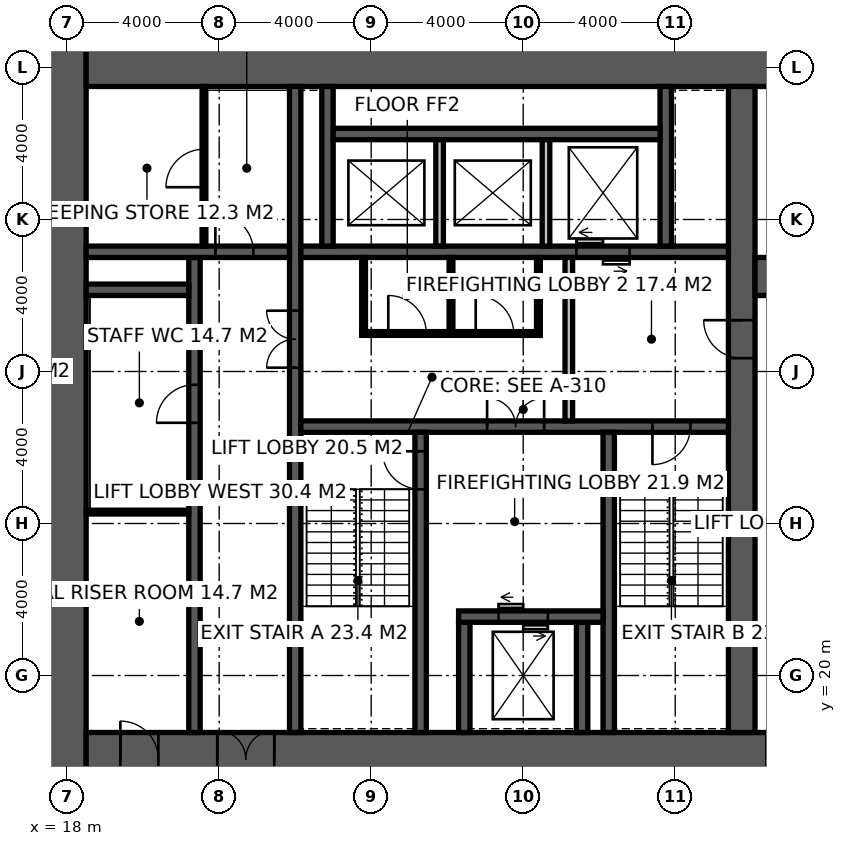
"""IFC4 building model, lengths in metres.
Left out: names, types, materials, properties, quantities, classifications, styles, units other than length and angle.
Written with IfcOpenShell. Run it as: python <this file> out.ifc"""

import sys

from ifc_helpers import new_model, si_unit, direction, frame, frame_2d, origin, place, context, subcontext, project, spatial, rectangle, extrude, element, fill, save


model = new_model("IFC4")
c1 = context("Model", 3, precision=1e-05, world=origin(), true_north=direction((0.0, 1.0)))
c2 = subcontext(c1, "Body", "Model", "MODEL_VIEW")
j1 = project(units=[si_unit("LENGTHUNIT", "METRE"), si_unit("PLANEANGLEUNIT", "RADIAN")], contexts=[c1])
p1 = place(None, origin())
s1 = spatial("IfcSite", under=j1, at=p1, CompositionType="ELEMENT")
p2 = place(p1, origin())
s2 = spatial("IfcBuilding", under=s1, at=p2, CompositionType="ELEMENT")
p3 = place(p2, frame((0.0, 0.0, 11.0)))
s3 = spatial("IfcBuildingStorey", under=s2, at=p3, CompositionType="ELEMENT", Elevation=11.0)
p4 = place(p3, frame((18.0, 17.1, -0.15), z_axis=(0.0, 0.0, 1.0), x_axis=(0.0, 1.0, 0.0)))
e1 = element("IfcWall", 1, at=p4, inside=s3, PredefinedType="SHEAR", context=c2, shape_type="SweptSolid", body=[
    extrude(rectangle(XDim=19.8, YDim=1.0, at=frame_2d((9.9, 0.0))), origin(), (0.0, 0.0, 1.0), 4.0),
])
p5 = place(p3, frame((18.5, 17.8, -0.15), z_axis=(0.0, 0.0, 1.0), x_axis=(1.0, 0.0, 0.0)))
e2 = element("IfcWall", 2, at=p5, inside=s3, PredefinedType="SHEAR", context=c2, shape_type="SweptSolid", body=[
    extrude(rectangle(XDim=23.0, YDim=1.4, at=frame_2d((11.5, 0.0))), origin(), (0.0, 0.0, 1.0), 4.0),
])
p6 = place(p5, frame((3.45, 0.0, 0.15)))
e3 = element("IfcOpeningElement", 3, at=p6, cuts=e2, PredefinedType="OPENING", context=c2, shape_type="SweptSolid", body=[
    extrude(rectangle(XDim=1.5, YDim=2.4, at=frame_2d((0.75, 1.2))), frame((0.0, 0.71, 0.0), z_axis=(0.0, -1.0, 0.0), x_axis=(1.0, 0.0, 0.0)), (0.0, 0.0, 1.0), 1.42),
])
p7 = place(p5, frame((17.9, 0.0, 0.15)))
e4 = element("IfcOpeningElement", 4, at=p7, cuts=e2, PredefinedType="OPENING", context=c2, shape_type="SweptSolid", body=[
    extrude(rectangle(XDim=1.5, YDim=2.4, at=frame_2d((0.75, 1.2))), frame((0.0, 0.71, 0.0), z_axis=(0.0, -1.0, 0.0), x_axis=(1.0, 0.0, 0.0)), (0.0, 0.0, 1.0), 1.42),
])
p8 = place(p5, frame((0.9, 0.0, 0.15)))
e5 = element("IfcOpeningElement", 5, at=p8, cuts=e2, PredefinedType="OPENING", context=c2, shape_type="SweptSolid", body=[
    extrude(rectangle(XDim=1.0, YDim=2.2, at=frame_2d((0.5, 1.1))), frame((0.0, 0.71, 0.0), z_axis=(0.0, -1.0, 0.0), x_axis=(1.0, 0.0, 0.0)), (0.0, 0.0, 1.0), 1.42),
])
p9 = place(p3, frame((18.5, 36.2, -0.15), z_axis=(0.0, 0.0, 1.0), x_axis=(1.0, 0.0, 0.0)))
e6 = element("IfcWall", 6, at=p9, inside=s3, PredefinedType="SHEAR", context=c2, shape_type="SweptSolid", body=[
    extrude(rectangle(XDim=23.0, YDim=1.4, at=frame_2d((11.5, 0.0))), origin(), (0.0, 0.0, 1.0), 4.0),
])
p10 = place(p3, frame((35.75, 18.5, -0.15), z_axis=(0.0, 0.0, 1.0), x_axis=(0.0, 1.0, 0.0)))
e7 = element("IfcWall", 7, at=p10, inside=s3, PredefinedType="SHEAR", context=c2, shape_type="SweptSolid", body=[
    extrude(rectangle(XDim=17.0, YDim=0.7, at=frame_2d((8.5, 0.0))), origin(), (0.0, 0.0, 1.0), 4.0),
])
p11 = place(p10, frame((9.85, 0.0, 0.15)))
e8 = element("IfcOpeningElement", 8, at=p11, cuts=e7, PredefinedType="OPENING", context=c2, shape_type="SweptSolid", body=[
    extrude(rectangle(XDim=1.0, YDim=2.2, at=frame_2d((0.5, 1.1))), frame((0.0, 0.36, 0.0), z_axis=(0.0, -1.0, 0.0), x_axis=(1.0, 0.0, 0.0)), (0.0, 0.0, 1.0), 0.72),
])
p12 = place(p3, frame((24.0, 18.5, -0.15), z_axis=(0.0, 0.0, 1.0), x_axis=(0.0, 1.0, 0.0)))
e9 = element("IfcWall", 9, at=p12, inside=s3, PredefinedType="SHEAR", context=c2, shape_type="SweptSolid", body=[
    extrude(rectangle(XDim=17.0, YDim=0.3, at=frame_2d((8.5, 0.0))), origin(), (0.0, 0.0, 1.0), 4.0),
])
p13 = place(p12, frame((9.6, 0.0, 0.15)))
e10 = element("IfcOpeningElement", 10, at=p13, cuts=e9, PredefinedType="OPENING", context=c2, shape_type="SweptSolid", body=[
    extrude(rectangle(XDim=1.5, YDim=2.4, at=frame_2d((0.75, 1.2))), frame((0.0, 0.16, 0.0), z_axis=(0.0, -1.0, 0.0), x_axis=(1.0, 0.0, 0.0)), (0.0, 0.0, 1.0), 0.32),
])
p14 = place(p3, frame((24.15, 26.55, -0.15), z_axis=(0.0, 0.0, 1.0), x_axis=(1.0, 0.0, 0.0)))
e11 = element("IfcWall", 11, at=p14, inside=s3, PredefinedType="SHEAR", context=c2, shape_type="SweptSolid", body=[
    extrude(rectangle(XDim=11.25, YDim=0.3, at=frame_2d((5.625, 0.0))), origin(), (0.0, 0.0, 1.0), 4.0),
])
p15 = place(p14, frame((9.25, 0.0, 0.15)))
e12 = element("IfcOpeningElement", 12, at=p15, cuts=e11, PredefinedType="OPENING", context=c2, shape_type="SweptSolid", body=[
    extrude(rectangle(XDim=1.0, YDim=2.2, at=frame_2d((0.5, 1.1))), frame((0.0, 0.16, 0.0), z_axis=(0.0, -1.0, 0.0), x_axis=(1.0, 0.0, 0.0)), (0.0, 0.0, 1.0), 0.32),
])
p16 = place(p14, frame((4.9, 0.0, 0.15)))
e13 = element("IfcOpeningElement", 13, at=p16, cuts=e11, PredefinedType="OPENING", context=c2, shape_type="SweptSolid", body=[
    extrude(rectangle(XDim=1.5, YDim=2.4, at=frame_2d((0.75, 1.2))), frame((0.0, 0.16, 0.0), z_axis=(0.0, -1.0, 0.0), x_axis=(1.0, 0.0, 0.0)), (0.0, 0.0, 1.0), 0.32),
])
p17 = place(p3, frame((27.3, 18.5, -0.15), z_axis=(0.0, 0.0, 1.0), x_axis=(0.0, 1.0, 0.0)))
e14 = element("IfcWall", 14, at=p17, inside=s3, PredefinedType="SHEAR", context=c2, shape_type="SweptSolid", body=[
    extrude(rectangle(XDim=7.9, YDim=0.3, at=frame_2d((3.95, 0.0))), origin(), (0.0, 0.0, 1.0), 4.0),
])
p18 = place(p17, frame((6.4, 0.0, 0.15)))
e15 = element("IfcOpeningElement", 15, at=p18, cuts=e14, PredefinedType="OPENING", context=c2, shape_type="SweptSolid", body=[
    extrude(rectangle(XDim=1.0, YDim=2.2, at=frame_2d((0.5, 1.1))), frame((0.0, 0.16, 0.0), z_axis=(0.0, -1.0, 0.0), x_axis=(1.0, 0.0, 0.0)), (0.0, 0.0, 1.0), 0.32),
])
p19 = place(p3, frame((32.25, 18.5, -0.15), z_axis=(0.0, 0.0, 1.0), x_axis=(0.0, 1.0, 0.0)))
e16 = element("IfcWall", 16, at=p19, inside=s3, PredefinedType="SHEAR", context=c2, shape_type="SweptSolid", body=[
    extrude(rectangle(XDim=7.9, YDim=0.3, at=frame_2d((3.95, 0.0))), origin(), (0.0, 0.0, 1.0), 4.0),
])
for number, where, z_axis, x_axis in (
    (17, (28.45, 18.5, -0.15), (0.0, 0.0, 1.0), (0.0, 1.0, 0.0)),
    (18, (31.55, 18.5, -0.15), (0.0, 0.0, 1.0), (0.0, 1.0, 0.0)),
):
    element("IfcWall", number, at=place(p3, frame(where, z_axis=z_axis, x_axis=x_axis)), inside=s3, PredefinedType="SHEAR", context=c2, shape_type="SweptSolid", body=[
        extrude(rectangle(XDim=2.9, YDim=0.3, at=frame_2d((1.45, 0.0))), origin(), (0.0, 0.0, 1.0), 4.0),
    ])
p20 = place(p3, frame((28.3, 21.55, -0.15), z_axis=(0.0, 0.0, 1.0), x_axis=(1.0, 0.0, 0.0)))
e19 = element("IfcWall", 19, at=p20, inside=s3, PredefinedType="SHEAR", context=c2, shape_type="SweptSolid", body=[
    extrude(rectangle(XDim=3.8, YDim=0.3, at=frame_2d((1.9, 0.0))), origin(), (0.0, 0.0, 1.0), 4.0),
])
p21 = place(p20, frame((1.05, 0.0, 0.15)))
e20 = element("IfcOpeningElement", 20, at=p21, cuts=e19, PredefinedType="OPENING", context=c2, shape_type="SweptSolid", body=[
    extrude(rectangle(XDim=1.3, YDim=2.4, at=frame_2d((0.65, 1.2))), frame((0.0, 0.16, 0.0), z_axis=(0.0, -1.0, 0.0), x_axis=(1.0, 0.0, 0.0)), (0.0, 0.0, 1.0), 0.32),
])
p22 = place(p3, frame((24.15, 31.15, -0.15), z_axis=(0.0, 0.0, 1.0), x_axis=(1.0, 0.0, 0.0)))
e21 = element("IfcWall", 21, at=p22, inside=s3, PredefinedType="SHEAR", context=c2, shape_type="SweptSolid", body=[
    extrude(rectangle(XDim=11.25, YDim=0.3, at=frame_2d((5.625, 0.0))), origin(), (0.0, 0.0, 1.0), 4.0),
])
p23 = place(p22, frame((7.25, 0.0, 0.15)))
e22 = element("IfcOpeningElement", 22, at=p23, cuts=e21, PredefinedType="OPENING", context=c2, shape_type="SweptSolid", body=[
    extrude(rectangle(XDim=1.4, YDim=2.4, at=frame_2d((0.7, 1.2))), frame((0.0, 0.16, 0.0), z_axis=(0.0, -1.0, 0.0), x_axis=(1.0, 0.0, 0.0)), (0.0, 0.0, 1.0), 0.32),
])
p24 = place(p3, frame((21.35, 18.5, -0.15), z_axis=(0.0, 0.0, 1.0), x_axis=(0.0, 1.0, 0.0)))
e23 = element("IfcWall", 23, at=p24, inside=s3, PredefinedType="SHEAR", context=c2, shape_type="SweptSolid", body=[
    extrude(rectangle(XDim=12.5, YDim=0.3, at=frame_2d((6.25, 0.0))), origin(), (0.0, 0.0, 1.0), 4.0),
])
p25 = place(p24, frame((8.15, 0.0, 0.15)))
e24 = element("IfcOpeningElement", 24, at=p25, cuts=e23, PredefinedType="OPENING", context=c2, shape_type="SweptSolid", body=[
    extrude(rectangle(XDim=1.0, YDim=2.2, at=frame_2d((0.5, 1.1))), frame((0.0, 0.16, 0.0), z_axis=(0.0, -1.0, 0.0), x_axis=(1.0, 0.0, 0.0)), (0.0, 0.0, 1.0), 0.32),
])
p26 = place(p3, frame((18.5, 31.15, -0.15), z_axis=(0.0, 0.0, 1.0), x_axis=(1.0, 0.0, 0.0)))
e25 = element("IfcWall", 25, at=p26, inside=s3, PredefinedType="SHEAR", context=c2, shape_type="SweptSolid", body=[
    extrude(rectangle(XDim=5.35, YDim=0.3, at=frame_2d((2.675, 0.0))), origin(), (0.0, 0.0, 1.0), 4.0),
])
p27 = place(p26, frame((3.4, 0.0, 0.15)))
e26 = element("IfcOpeningElement", 26, at=p27, cuts=e25, PredefinedType="OPENING", context=c2, shape_type="SweptSolid", body=[
    extrude(rectangle(XDim=1.0, YDim=2.2, at=frame_2d((0.5, 1.1))), frame((0.0, 0.16, 0.0), z_axis=(0.0, -1.0, 0.0), x_axis=(1.0, 0.0, 0.0)), (0.0, 0.0, 1.0), 0.32),
])
p28 = place(p3, frame((18.5, 30.15, -0.15), z_axis=(0.0, 0.0, 1.0), x_axis=(1.0, 0.0, 0.0)))
e27 = element("IfcWall", 27, at=p28, inside=s3, PredefinedType="SHEAR", context=c2, shape_type="SweptSolid", body=[
    extrude(rectangle(XDim=2.7, YDim=0.3, at=frame_2d((1.35, 0.0))), origin(), (0.0, 0.0, 1.0), 4.0),
])
for number, where, z_axis, x_axis in (
    (28, (24.85, 31.3, -0.15), (0.0, 0.0, 1.0), (0.0, 1.0, 0.0)),
    (29, (33.75, 31.3, -0.15), (0.0, 0.0, 1.0), (0.0, 1.0, 0.0)),
):
    element("IfcWall", number, at=place(p3, frame(where, z_axis=z_axis, x_axis=x_axis)), inside=s3, PredefinedType="SHEAR", context=c2, shape_type="SweptSolid", body=[
        extrude(rectangle(XDim=4.2, YDim=0.3, at=frame_2d((2.1, 0.0))), origin(), (0.0, 0.0, 1.0), 4.0),
    ])
p29 = place(p3, frame((25.0, 34.25, -0.15), z_axis=(0.0, 0.0, 1.0), x_axis=(1.0, 0.0, 0.0)))
e30 = element("IfcWall", 30, at=p29, inside=s3, PredefinedType="SHEAR", context=c2, shape_type="SweptSolid", body=[
    extrude(rectangle(XDim=8.6, YDim=0.3, at=frame_2d((4.3, 0.0))), origin(), (0.0, 0.0, 1.0), 4.0),
])
for number, where, z_axis, x_axis in (
    (31, (27.8, 31.3, -0.15), (0.0, 0.0, 1.0), (0.0, 1.0, 0.0)),
    (32, (30.6, 31.3, -0.15), (0.0, 0.0, 1.0), (0.0, 1.0, 0.0)),
):
    element("IfcWall", number, at=place(p3, frame(where, z_axis=z_axis, x_axis=x_axis)), inside=s3, PredefinedType="SOLIDWALL", context=c2, shape_type="SweptSolid", body=[
        extrude(rectangle(XDim=2.8, YDim=0.2, at=frame_2d((1.4, 0.0))), origin(), (0.0, 0.0, 1.0), 4.0),
    ])
p30 = place(p3, frame((36.1, 30.5, -0.15), z_axis=(0.0, 0.0, 1.0), x_axis=(1.0, 0.0, 0.0)))
e33 = element("IfcWall", 33, at=p30, inside=s3, PredefinedType="SHEAR", context=c2, shape_type="SweptSolid", body=[
    extrude(rectangle(XDim=5.4, YDim=1.0, at=frame_2d((2.7, 0.0))), origin(), (0.0, 0.0, 1.0), 4.0),
])
p31 = place(p30, frame((0.6, 0.0, 0.15)))
e34 = element("IfcOpeningElement", 34, at=p31, cuts=e33, PredefinedType="OPENING", context=c2, shape_type="SweptSolid", body=[
    extrude(rectangle(XDim=1.0, YDim=2.2, at=frame_2d((0.5, 1.1))), frame((0.0, 0.51, 0.0), z_axis=(0.0, -1.0, 0.0), x_axis=(1.0, 0.0, 0.0)), (0.0, 0.0, 1.0), 1.02),
])
p32 = place(p3, frame((31.2, 26.7, 0.0), z_axis=(0.0, 0.0, 1.0), x_axis=(0.0, 1.0, 0.0)))
e35 = element("IfcWall", 35, at=p32, inside=s3, PredefinedType="SOLIDWALL", context=c2, shape_type="SweptSolid", body=[
    extrude(rectangle(XDim=4.3, YDim=0.2, at=frame_2d((2.15, 0.0))), origin(), (0.0, 0.0, 1.0), 3.85),
])
p33 = place(p3, frame((21.6, 31.3, 0.0), z_axis=(0.0, 0.0, 1.0), x_axis=(0.0, 1.0, 0.0)))
e36 = element("IfcWall", 36, at=p33, inside=s3, PredefinedType="PARTITIONING", context=c2, shape_type="SweptSolid", body=[
    extrude(rectangle(XDim=4.2, YDim=0.1, at=frame_2d((2.1, 0.0))), origin(), (0.0, 0.0, 1.0), 3.85),
])
p34 = place(p33, frame((1.55, 0.0, 0.0)))
e37 = element("IfcOpeningElement", 37, at=p34, cuts=e36, PredefinedType="OPENING", context=c2, shape_type="SweptSolid", body=[
    extrude(rectangle(XDim=1.0, YDim=2.2, at=frame_2d((0.5, 1.1))), frame((0.0, 0.06, 0.0), z_axis=(0.0, -1.0, 0.0), x_axis=(1.0, 0.0, 0.0)), (0.0, 0.0, 1.0), 0.12),
])
p35 = place(p3, frame((25.75, 29.0, 0.0), z_axis=(0.0, 0.0, 1.0), x_axis=(1.0, 0.0, 0.0)))
e38 = element("IfcWall", 38, at=p35, inside=s3, PredefinedType="PARTITIONING", context=c2, shape_type="SweptSolid", body=[
    extrude(rectangle(XDim=4.7, YDim=0.1, at=frame_2d((2.35, 0.0))), origin(), (0.0, 0.0, 1.0), 3.85),
])
p36 = place(p35, frame((0.7, 0.0, 0.0)))
e39 = element("IfcOpeningElement", 39, at=p36, cuts=e38, PredefinedType="OPENING", context=c2, shape_type="SweptSolid", body=[
    extrude(rectangle(XDim=1.0, YDim=2.2, at=frame_2d((0.5, 1.1))), frame((0.0, 0.06, 0.0), z_axis=(0.0, -1.0, 0.0), x_axis=(1.0, 0.0, 0.0)), (0.0, 0.0, 1.0), 0.12),
])
p37 = place(p35, frame((3.0, 0.0, 0.0)))
e40 = element("IfcOpeningElement", 40, at=p37, cuts=e38, PredefinedType="OPENING", context=c2, shape_type="SweptSolid", body=[
    extrude(rectangle(XDim=1.0, YDim=2.2, at=frame_2d((0.5, 1.1))), frame((0.0, 0.06, 0.0), z_axis=(0.0, -1.0, 0.0), x_axis=(1.0, 0.0, 0.0)), (0.0, 0.0, 1.0), 0.12),
])
for number, where, z_axis, x_axis in (
    (41, (25.8, 29.05, 0.0), (0.0, 0.0, 1.0), (0.0, 1.0, 0.0)),
    (42, (30.4, 29.05, 0.0), (0.0, 0.0, 1.0), (0.0, 1.0, 0.0)),
    (43, (28.1, 29.05, 0.0), (0.0, 0.0, 1.0), (0.0, 1.0, 0.0)),
):
    element("IfcWall", number, at=place(p3, frame(where, z_axis=z_axis, x_axis=x_axis)), inside=s3, PredefinedType="PARTITIONING", context=c2, shape_type="SweptSolid", body=[
        extrude(rectangle(XDim=1.95, YDim=0.1, at=frame_2d((0.975, 0.0))), origin(), (0.0, 0.0, 1.0), 3.85),
    ])
p38 = place(p3, frame((18.5, 24.3, 0.0), z_axis=(0.0, 0.0, 1.0), x_axis=(1.0, 0.0, 0.0)))
e44 = element("IfcWall", 44, at=p38, inside=s3, PredefinedType="PARTITIONING", context=c2, shape_type="SweptSolid", body=[
    extrude(rectangle(XDim=2.7, YDim=0.1, at=frame_2d((1.35, 0.0))), origin(), (0.0, 0.0, 1.0), 3.85),
])
p39 = place(p18, origin())
e45 = element("IfcDoor", 45, at=p39, inside=s3, OperationType="SINGLE_SWING_RIGHT", PredefinedType="DOOR", context=c2, shape_type="SweptSolid", body=[
    extrude(rectangle(XDim=1.0, YDim=2.2, at=frame_2d((0.5, 1.1))), frame((0.0, 0.025, 0.0), z_axis=(0.0, -1.0, 0.0), x_axis=(1.0, 0.0, 0.0)), (0.0, 0.0, 1.0), 0.05),
])
fill(e15, e45)
p40 = place(p15, frame((1.0, 0.0, 0.0), z_axis=(0.0, 0.0, 1.0), x_axis=(-1.0, 0.0, 0.0)))
e46 = element("IfcDoor", 46, at=p40, inside=s3, OperationType="SINGLE_SWING_RIGHT", PredefinedType="DOOR", context=c2, shape_type="SweptSolid", body=[
    extrude(rectangle(XDim=1.0, YDim=2.2, at=frame_2d((0.5, 1.1))), frame((0.0, 0.025, 0.0), z_axis=(0.0, -1.0, 0.0), x_axis=(1.0, 0.0, 0.0)), (0.0, 0.0, 1.0), 0.05),
])
fill(e12, e46)
p41 = place(p11, origin())
e47 = element("IfcDoor", 47, at=p41, inside=s3, OperationType="SINGLE_SWING_RIGHT", PredefinedType="DOOR", context=c2, shape_type="SweptSolid", body=[
    extrude(rectangle(XDim=1.0, YDim=2.2, at=frame_2d((0.5, 1.1))), frame((0.0, 0.025, 0.0), z_axis=(0.0, -1.0, 0.0), x_axis=(1.0, 0.0, 0.0)), (0.0, 0.0, 1.0), 0.05),
])
fill(e8, e47)
p42 = place(p16, origin())
e48 = element("IfcDoor", 48, at=p42, inside=s3, OperationType="DOUBLE_DOOR_DOUBLE_SWING", PredefinedType="DOOR", context=c2, shape_type="SweptSolid", body=[
    extrude(rectangle(XDim=1.5, YDim=2.4, at=frame_2d((0.75, 1.2))), frame((0.0, 0.025, 0.0), z_axis=(0.0, -1.0, 0.0), x_axis=(1.0, 0.0, 0.0)), (0.0, 0.0, 1.0), 0.05),
])
fill(e13, e48)
p43 = place(p13, origin())
e49 = element("IfcDoor", 49, at=p43, inside=s3, OperationType="DOUBLE_DOOR_DOUBLE_SWING", PredefinedType="DOOR", context=c2, shape_type="SweptSolid", body=[
    extrude(rectangle(XDim=1.5, YDim=2.4, at=frame_2d((0.75, 1.2))), frame((0.0, 0.025, 0.0), z_axis=(0.0, -1.0, 0.0), x_axis=(1.0, 0.0, 0.0)), (0.0, 0.0, 1.0), 0.05),
])
fill(e10, e49)
p44 = place(p27, origin())
e50 = element("IfcDoor", 50, at=p44, inside=s3, OperationType="SINGLE_SWING_LEFT", PredefinedType="DOOR", context=c2, shape_type="SweptSolid", body=[
    extrude(rectangle(XDim=1.0, YDim=2.2, at=frame_2d((0.5, 1.1))), frame((0.0, 0.025, 0.0), z_axis=(0.0, -1.0, 0.0), x_axis=(1.0, 0.0, 0.0)), (0.0, 0.0, 1.0), 0.05),
])
fill(e26, e50)
p45 = place(p34, origin())
e51 = element("IfcDoor", 51, at=p45, inside=s3, OperationType="SINGLE_SWING_LEFT", PredefinedType="DOOR", context=c2, shape_type="SweptSolid", body=[
    extrude(rectangle(XDim=1.0, YDim=2.2, at=frame_2d((0.5, 1.1))), frame((0.0, 0.025, 0.0), z_axis=(0.0, -1.0, 0.0), x_axis=(1.0, 0.0, 0.0)), (0.0, 0.0, 1.0), 0.05),
])
fill(e37, e51)
p46 = place(p36, origin())
e52 = element("IfcDoor", 52, at=p46, inside=s3, OperationType="SINGLE_SWING_LEFT", PredefinedType="DOOR", context=c2, shape_type="SweptSolid", body=[
    extrude(rectangle(XDim=1.0, YDim=2.2, at=frame_2d((0.5, 1.1))), frame((0.0, 0.025, 0.0), z_axis=(0.0, -1.0, 0.0), x_axis=(1.0, 0.0, 0.0)), (0.0, 0.0, 1.0), 0.05),
])
fill(e39, e52)
p47 = place(p37, origin())
e53 = element("IfcDoor", 53, at=p47, inside=s3, OperationType="SINGLE_SWING_LEFT", PredefinedType="DOOR", context=c2, shape_type="SweptSolid", body=[
    extrude(rectangle(XDim=1.0, YDim=2.2, at=frame_2d((0.5, 1.1))), frame((0.0, 0.025, 0.0), z_axis=(0.0, -1.0, 0.0), x_axis=(1.0, 0.0, 0.0)), (0.0, 0.0, 1.0), 0.05),
])
fill(e40, e53)
p48 = place(p25, origin())
e54 = element("IfcDoor", 54, at=p48, inside=s3, OperationType="SINGLE_SWING_LEFT", PredefinedType="DOOR", context=c2, shape_type="SweptSolid", body=[
    extrude(rectangle(XDim=1.0, YDim=2.2, at=frame_2d((0.5, 1.1))), frame((0.0, 0.025, 0.0), z_axis=(0.0, -1.0, 0.0), x_axis=(1.0, 0.0, 0.0)), (0.0, 0.0, 1.0), 0.05),
])
fill(e24, e54)
p49 = place(p6, origin())
e55 = element("IfcDoor", 55, at=p49, inside=s3, OperationType="DOUBLE_DOOR_DOUBLE_SWING", PredefinedType="DOOR", context=c2, shape_type="SweptSolid", body=[
    extrude(rectangle(XDim=1.5, YDim=2.4, at=frame_2d((0.75, 1.2))), frame((0.0, 0.025, 0.0), z_axis=(0.0, -1.0, 0.0), x_axis=(1.0, 0.0, 0.0)), (0.0, 0.0, 1.0), 0.05),
])
fill(e3, e55)
p50 = place(p8, origin())
e56 = element("IfcDoor", 56, at=p50, inside=s3, OperationType="SINGLE_SWING_LEFT", PredefinedType="DOOR", context=c2, shape_type="SweptSolid", body=[
    extrude(rectangle(XDim=1.0, YDim=2.2, at=frame_2d((0.5, 1.1))), frame((0.0, 0.025, 0.0), z_axis=(0.0, -1.0, 0.0), x_axis=(1.0, 0.0, 0.0)), (0.0, 0.0, 1.0), 0.05),
])
fill(e5, e56)
p51 = place(p21, origin())
e57 = element("IfcDoor", 57, at=p51, inside=s3, OperationType="DOUBLE_DOOR_SLIDING", PredefinedType="DOOR", context=c2, shape_type="SweptSolid", body=[
    extrude(rectangle(XDim=1.3, YDim=2.4, at=frame_2d((0.65, 1.2))), frame((0.0, 0.025, 0.0), z_axis=(0.0, -1.0, 0.0), x_axis=(1.0, 0.0, 0.0)), (0.0, 0.0, 1.0), 0.05),
])
fill(e20, e57)
p52 = place(p23, origin())
e58 = element("IfcDoor", 58, at=p52, inside=s3, OperationType="DOUBLE_DOOR_SLIDING", PredefinedType="DOOR", context=c2, shape_type="SweptSolid", body=[
    extrude(rectangle(XDim=1.4, YDim=2.4, at=frame_2d((0.7, 1.2))), frame((0.0, 0.025, 0.0), z_axis=(0.0, -1.0, 0.0), x_axis=(1.0, 0.0, 0.0)), (0.0, 0.0, 1.0), 0.05),
])
fill(e22, e58)
save(model, sys.argv[1])
